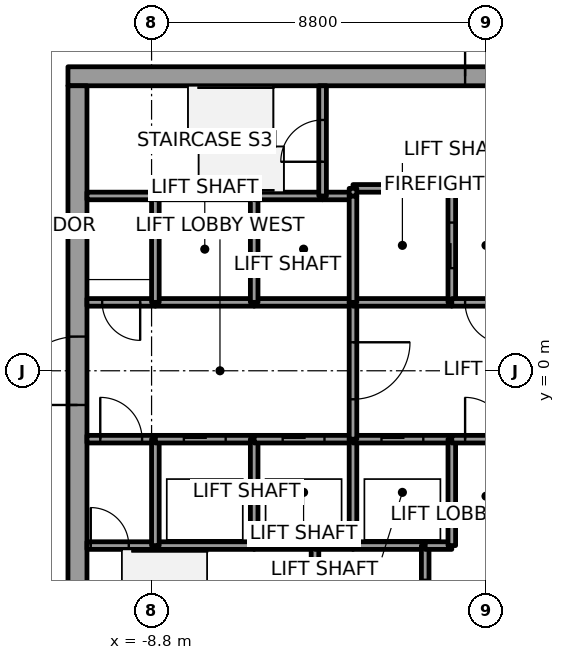
"""IFC4 building model, lengths in metres.
Left out: names, types, materials, properties, quantities, classifications, styles, units other than length and angle.
Written with IfcOpenShell. Run it as: python <this file> out.ifc"""

import sys

from ifc_helpers import new_model, si_unit, direction, frame, frame_2d, origin, place, context, subcontext, project, spatial, rectangle, extrude, element, fill, save


model = new_model("IFC4")
c1 = context("Model", 3, precision=1e-05, world=origin(), true_north=direction((0.0, 1.0)))
c2 = subcontext(c1, "Body", "Model", "MODEL_VIEW")
j1 = project(units=[si_unit("LENGTHUNIT", "METRE"), si_unit("PLANEANGLEUNIT", "RADIAN")], contexts=[c1])
p1 = place(None, origin())
s1 = spatial("IfcSite", under=j1, at=p1, CompositionType="ELEMENT")
p2 = place(p1, origin())
s2 = spatial("IfcBuilding", under=s1, at=p2, CompositionType="ELEMENT")
p3 = place(p2, frame((0.0, 0.0, 107.2)))
s3 = spatial("IfcBuildingStorey", under=s2, at=p3, CompositionType="ELEMENT", Elevation=107.2)
p4 = place(p3, frame((-11.0, 7.75, 0.0), z_axis=(0.0, 0.0, 1.0), x_axis=(1.0, 0.0, 0.0)))
e1 = element("IfcWall", 1, at=p4, inside=s3, PredefinedType="SHEAR", context=c2, shape_type="SweptSolid", body=[
    extrude(rectangle(XDim=22.0, YDim=0.5, at=frame_2d((11.0, 0.0))), origin(), (0.0, 0.0, 1.0), 5.4),
])
p5 = place(p4, frame((10.45, 0.0, 0.0)))
e2 = element("IfcOpeningElement", 2, at=p5, cuts=e1, PredefinedType="OPENING", context=c2, shape_type="SweptSolid", body=[
    extrude(rectangle(XDim=1.1, YDim=2.1, at=frame_2d((0.55, 1.05))), frame((0.0, 0.25, 0.0), z_axis=(0.0, -1.0, 0.0), x_axis=(1.0, 0.0, 0.0)), (0.0, 0.0, 1.0), 0.5),
])
p6 = place(p3, frame((-10.75, -7.5, 0.0), z_axis=(0.0, 0.0, 1.0), x_axis=(0.0, 1.0, 0.0)))
e3 = element("IfcWall", 3, at=p6, inside=s3, PredefinedType="SHEAR", context=c2, shape_type="SweptSolid", body=[
    extrude(rectangle(XDim=15.0, YDim=0.5, at=frame_2d((7.5, 0.0))), origin(), (0.0, 0.0, 1.0), 5.4),
])
p7 = place(p6, frame((6.6, 0.0, 0.0)))
e4 = element("IfcOpeningElement", 4, at=p7, cuts=e3, PredefinedType="OPENING", context=c2, shape_type="SweptSolid", body=[
    extrude(rectangle(XDim=1.8, YDim=2.1, at=frame_2d((0.9, 1.05))), frame((0.0, 0.25, 0.0), z_axis=(0.0, -1.0, 0.0), x_axis=(1.0, 0.0, 0.0)), (0.0, 0.0, 1.0), 0.5),
])
p8 = place(p3, frame((-10.5, -4.6, 0.0), z_axis=(0.0, 0.0, 1.0), x_axis=(1.0, 0.0, 0.0)))
e5 = element("IfcWall", 5, at=p8, inside=s3, PredefinedType="SOLIDWALL", context=c2, shape_type="SweptSolid", body=[
    extrude(rectangle(XDim=1.8, YDim=0.2, at=frame_2d((0.9, 0.0))), origin(), (0.0, 0.0, 1.0), 5.25),
])
p9 = place(p8, frame((0.1, 0.0, 0.0)))
e6 = element("IfcOpeningElement", 6, at=p9, cuts=e5, PredefinedType="OPENING", context=c2, shape_type="SweptSolid", body=[
    extrude(rectangle(XDim=1.0, YDim=2.1, at=frame_2d((0.5, 1.05))), frame((0.0, 0.1, 0.0), z_axis=(0.0, -1.0, 0.0), x_axis=(1.0, 0.0, 0.0)), (0.0, 0.0, 1.0), 0.2),
])
p10 = place(p3, frame((-10.5, -1.8, 0.0), z_axis=(0.0, 0.0, 1.0), x_axis=(1.0, 0.0, 0.0)))
e7 = element("IfcWall", 7, at=p10, inside=s3, PredefinedType="SOLIDWALL", context=c2, shape_type="SweptSolid", body=[
    extrude(rectangle(XDim=1.8, YDim=0.2, at=frame_2d((0.9, 0.0))), origin(), (0.0, 0.0, 1.0), 5.25),
])
p11 = place(p10, frame((0.35, 0.0, 0.0)))
e8 = element("IfcOpeningElement", 8, at=p11, cuts=e7, PredefinedType="OPENING", context=c2, shape_type="SweptSolid", body=[
    extrude(rectangle(XDim=1.1, YDim=2.1, at=frame_2d((0.55, 1.05))), frame((0.0, 0.1, 0.0), z_axis=(0.0, -1.0, 0.0), x_axis=(1.0, 0.0, 0.0)), (0.0, 0.0, 1.0), 0.2),
])
p12 = place(p3, frame((-8.7, 1.8, 0.0), z_axis=(0.0, 0.0, 1.0), x_axis=(-1.0, 0.0, 0.0)))
e9 = element("IfcWall", 9, at=p12, inside=s3, PredefinedType="SOLIDWALL", context=c2, shape_type="SweptSolid", body=[
    extrude(rectangle(XDim=1.8, YDim=0.2, at=frame_2d((0.9, 0.0))), origin(), (0.0, 0.0, 1.0), 5.25),
])
p13 = place(p12, frame((0.4, 0.0, 0.0)))
e10 = element("IfcOpeningElement", 10, at=p13, cuts=e9, PredefinedType="OPENING", context=c2, shape_type="SweptSolid", body=[
    extrude(rectangle(XDim=1.0, YDim=2.1, at=frame_2d((0.5, 1.05))), frame((0.0, 0.1, 0.0), z_axis=(0.0, -1.0, 0.0), x_axis=(1.0, 0.0, 0.0)), (0.0, 0.0, 1.0), 0.2),
])
p14 = place(p3, frame((-8.7, 4.6, 0.0), z_axis=(0.0, 0.0, 1.0), x_axis=(-1.0, 0.0, 0.0)))
e11 = element("IfcWall", 11, at=p14, inside=s3, PredefinedType="SOLIDWALL", context=c2, shape_type="SweptSolid", body=[
    extrude(rectangle(XDim=1.8, YDim=0.2, at=frame_2d((0.9, 0.0))), origin(), (0.0, 0.0, 1.0), 5.25),
])
p15 = place(p3, frame((-8.7, -4.6, 0.0), z_axis=(0.0, 0.0, 1.0), x_axis=(1.0, 0.0, 0.0)))
e12 = element("IfcWall", 12, at=p15, inside=s3, PredefinedType="SOLIDWALL", context=c2, shape_type="SweptSolid", body=[
    extrude(rectangle(XDim=2.6, YDim=0.2, at=frame_2d((1.3, 0.0))), origin(), (0.0, 0.0, 1.0), 5.25),
])
p16 = place(p3, frame((-8.7, -4.6, 0.0), z_axis=(0.0, 0.0, 1.0), x_axis=(0.0, 1.0, 0.0)))
e13 = element("IfcWall", 13, at=p16, inside=s3, PredefinedType="SOLIDWALL", context=c2, shape_type="SweptSolid", body=[
    extrude(rectangle(XDim=2.8, YDim=0.2, at=frame_2d((1.4, 0.0))), origin(), (0.0, 0.0, 1.0), 5.25),
])
p17 = place(p3, frame((-8.7, -1.8, 0.0), z_axis=(0.0, 0.0, 1.0), x_axis=(1.0, 0.0, 0.0)))
e14 = element("IfcWall", 14, at=p17, inside=s3, PredefinedType="SOLIDWALL", context=c2, shape_type="SweptSolid", body=[
    extrude(rectangle(XDim=2.6, YDim=0.2, at=frame_2d((1.3, 0.0))), origin(), (0.0, 0.0, 1.0), 5.25),
])
p18 = place(p17, frame((0.75, 0.0, 0.0)))
e15 = element("IfcOpeningElement", 15, at=p18, cuts=e14, PredefinedType="OPENING", context=c2, shape_type="SweptSolid", body=[
    extrude(rectangle(XDim=1.1, YDim=2.1, at=frame_2d((0.55, 1.05))), frame((0.0, 0.1, 0.0), z_axis=(0.0, -1.0, 0.0), x_axis=(1.0, 0.0, 0.0)), (0.0, 0.0, 1.0), 0.2),
])
p19 = place(p3, frame((-6.1, 1.8, 0.0), z_axis=(0.0, 0.0, 1.0), x_axis=(-1.0, 0.0, 0.0)))
e16 = element("IfcWall", 16, at=p19, inside=s3, PredefinedType="SOLIDWALL", context=c2, shape_type="SweptSolid", body=[
    extrude(rectangle(XDim=2.6, YDim=0.2, at=frame_2d((1.3, 0.0))), origin(), (0.0, 0.0, 1.0), 5.25),
])
p20 = place(p3, frame((-8.7, 1.8, 0.0), z_axis=(0.0, 0.0, 1.0), x_axis=(0.0, 1.0, 0.0)))
e17 = element("IfcWall", 17, at=p20, inside=s3, PredefinedType="SOLIDWALL", context=c2, shape_type="SweptSolid", body=[
    extrude(rectangle(XDim=2.8, YDim=0.2, at=frame_2d((1.4, 0.0))), origin(), (0.0, 0.0, 1.0), 5.25),
])
p21 = place(p3, frame((-6.1, 4.6, 0.0), z_axis=(0.0, 0.0, 1.0), x_axis=(-1.0, 0.0, 0.0)))
e18 = element("IfcWall", 18, at=p21, inside=s3, PredefinedType="SOLIDWALL", context=c2, shape_type="SweptSolid", body=[
    extrude(rectangle(XDim=2.6, YDim=0.2, at=frame_2d((1.3, 0.0))), origin(), (0.0, 0.0, 1.0), 5.25),
])
p22 = place(p3, frame((-6.1, -4.6, 0.0), z_axis=(0.0, 0.0, 1.0), x_axis=(1.0, 0.0, 0.0)))
e19 = element("IfcWall", 19, at=p22, inside=s3, PredefinedType="SOLIDWALL", context=c2, shape_type="SweptSolid", body=[
    extrude(rectangle(XDim=1.6, YDim=0.2, at=frame_2d((0.8, 0.0))), origin(), (0.0, 0.0, 1.0), 5.25),
])
p23 = place(p3, frame((-6.1, -4.6, 0.0), z_axis=(0.0, 0.0, 1.0), x_axis=(0.0, 1.0, 0.0)))
e20 = element("IfcWall", 20, at=p23, inside=s3, PredefinedType="SOLIDWALL", context=c2, shape_type="SweptSolid", body=[
    extrude(rectangle(XDim=2.8, YDim=0.2, at=frame_2d((1.4, 0.0))), origin(), (0.0, 0.0, 1.0), 5.25),
])
p24 = place(p3, frame((-6.1, -1.8, 0.0), z_axis=(0.0, 0.0, 1.0), x_axis=(1.0, 0.0, 0.0)))
e21 = element("IfcWall", 21, at=p24, inside=s3, PredefinedType="SOLIDWALL", context=c2, shape_type="SweptSolid", body=[
    extrude(rectangle(XDim=2.6, YDim=0.2, at=frame_2d((1.3, 0.0))), origin(), (0.0, 0.0, 1.0), 5.25),
])
p25 = place(p24, frame((0.75, 0.0, 0.0)))
e22 = element("IfcOpeningElement", 22, at=p25, cuts=e21, PredefinedType="OPENING", context=c2, shape_type="SweptSolid", body=[
    extrude(rectangle(XDim=1.1, YDim=2.1, at=frame_2d((0.55, 1.05))), frame((0.0, 0.1, 0.0), z_axis=(0.0, -1.0, 0.0), x_axis=(1.0, 0.0, 0.0)), (0.0, 0.0, 1.0), 0.2),
])
p26 = place(p3, frame((-3.5, 1.8, 0.0), z_axis=(0.0, 0.0, 1.0), x_axis=(-1.0, 0.0, 0.0)))
e23 = element("IfcWall", 23, at=p26, inside=s3, PredefinedType="SOLIDWALL", context=c2, shape_type="SweptSolid", body=[
    extrude(rectangle(XDim=2.6, YDim=0.2, at=frame_2d((1.3, 0.0))), origin(), (0.0, 0.0, 1.0), 5.25),
])
p27 = place(p3, frame((-6.1, 1.8, 0.0), z_axis=(0.0, 0.0, 1.0), x_axis=(0.0, 1.0, 0.0)))
e24 = element("IfcWall", 24, at=p27, inside=s3, PredefinedType="SOLIDWALL", context=c2, shape_type="SweptSolid", body=[
    extrude(rectangle(XDim=2.8, YDim=0.2, at=frame_2d((1.4, 0.0))), origin(), (0.0, 0.0, 1.0), 5.25),
])
p28 = place(p3, frame((-4.3, 4.6, 0.0), z_axis=(0.0, 0.0, 1.0), x_axis=(-1.0, 0.0, 0.0)))
e25 = element("IfcWall", 25, at=p28, inside=s3, PredefinedType="SOLIDWALL", context=c2, shape_type="SweptSolid", body=[
    extrude(rectangle(XDim=1.8, YDim=0.2, at=frame_2d((0.9, 0.0))), origin(), (0.0, 0.0, 1.0), 5.25),
])
p29 = place(p3, frame((-4.5, -4.6, 0.0), z_axis=(0.0, 0.0, 1.0), x_axis=(0.0, -1.0, 0.0)))
e26 = element("IfcWall", 26, at=p29, inside=s3, PredefinedType="SOLIDWALL", context=c2, shape_type="SweptSolid", body=[
    extrude(rectangle(XDim=2.9, YDim=0.2, at=frame_2d((1.45, 0.0))), origin(), (0.0, 0.0, 1.0), 5.25),
])
p30 = place(p3, frame((-4.5, -4.6, 0.0), z_axis=(0.0, 0.0, 1.0), x_axis=(1.0, 0.0, 0.0)))
e27 = element("IfcWall", 27, at=p30, inside=s3, PredefinedType="SOLIDWALL", context=c2, shape_type="SweptSolid", body=[
    extrude(rectangle(XDim=1.0, YDim=0.2, at=frame_2d((0.5, 0.0))), origin(), (0.0, 0.0, 1.0), 5.25),
])
p31 = place(p3, frame((-3.5, 4.6, 0.0), z_axis=(0.0, 0.0, 1.0), x_axis=(-1.0, 0.0, 0.0)))
e28 = element("IfcWall", 28, at=p31, inside=s3, PredefinedType="SOLIDWALL", context=c2, shape_type="SweptSolid", body=[
    extrude(rectangle(XDim=0.8, YDim=0.2, at=frame_2d((0.4, 0.0))), origin(), (0.0, 0.0, 1.0), 5.25),
])
p32 = place(p3, frame((-4.3, 4.6, 0.0), z_axis=(0.0, 0.0, 1.0), x_axis=(0.0, 1.0, 0.0)))
e29 = element("IfcWall", 29, at=p32, inside=s3, PredefinedType="SOLIDWALL", context=c2, shape_type="SweptSolid", body=[
    extrude(rectangle(XDim=2.9, YDim=0.2, at=frame_2d((1.45, 0.0))), origin(), (0.0, 0.0, 1.0), 5.25),
])
p33 = place(p32, frame((0.9, 0.0, 0.0)))
e30 = element("IfcOpeningElement", 30, at=p33, cuts=e29, PredefinedType="OPENING", context=c2, shape_type="SweptSolid", body=[
    extrude(rectangle(XDim=1.1, YDim=2.1, at=frame_2d((0.55, 1.05))), frame((0.0, 0.1, 0.0), z_axis=(0.0, -1.0, 0.0), x_axis=(1.0, 0.0, 0.0)), (0.0, 0.0, 1.0), 0.2),
])
p34 = place(p3, frame((-3.5, -4.6, 0.0), z_axis=(0.0, 0.0, 1.0), x_axis=(1.0, 0.0, 0.0)))
e31 = element("IfcWall", 31, at=p34, inside=s3, PredefinedType="SOLIDWALL", context=c2, shape_type="SweptSolid", body=[
    extrude(rectangle(XDim=1.9, YDim=0.2, at=frame_2d((0.95, 0.0))), origin(), (0.0, 0.0, 1.0), 5.25),
])
p35 = place(p3, frame((-3.5, -4.6, 0.0), z_axis=(0.0, 0.0, 1.0), x_axis=(0.0, 1.0, 0.0)))
e32 = element("IfcWall", 32, at=p35, inside=s3, PredefinedType="SOLIDWALL", context=c2, shape_type="SweptSolid", body=[
    extrude(rectangle(XDim=2.8, YDim=0.2, at=frame_2d((1.4, 0.0))), origin(), (0.0, 0.0, 1.0), 5.25),
])
p36 = place(p3, frame((-3.5, -1.8, 0.0), z_axis=(0.0, 0.0, 1.0), x_axis=(1.0, 0.0, 0.0)))
e33 = element("IfcWall", 33, at=p36, inside=s3, PredefinedType="SOLIDWALL", context=c2, shape_type="SweptSolid", body=[
    extrude(rectangle(XDim=2.6, YDim=0.2, at=frame_2d((1.3, 0.0))), origin(), (0.0, 0.0, 1.0), 5.25),
])
p37 = place(p36, frame((0.75, 0.0, 0.0)))
e34 = element("IfcOpeningElement", 34, at=p37, cuts=e33, PredefinedType="OPENING", context=c2, shape_type="SweptSolid", body=[
    extrude(rectangle(XDim=1.1, YDim=2.1, at=frame_2d((0.55, 1.05))), frame((0.0, 0.1, 0.0), z_axis=(0.0, -1.0, 0.0), x_axis=(1.0, 0.0, 0.0)), (0.0, 0.0, 1.0), 0.2),
])
p38 = place(p3, frame((-3.5, 1.8, 0.0), z_axis=(0.0, 0.0, 1.0), x_axis=(0.0, -1.0, 0.0)))
e35 = element("IfcWall", 35, at=p38, inside=s3, PredefinedType="SOLIDWALL", context=c2, shape_type="SweptSolid", body=[
    extrude(rectangle(XDim=3.6, YDim=0.2, at=frame_2d((1.8, 0.0))), origin(), (0.0, 0.0, 1.0), 5.25),
])
p39 = place(p38, frame((1.05, 0.0, 0.0)))
e36 = element("IfcOpeningElement", 36, at=p39, cuts=e35, PredefinedType="OPENING", context=c2, shape_type="SweptSolid", body=[
    extrude(rectangle(XDim=1.5, YDim=2.1, at=frame_2d((0.75, 1.05))), frame((0.0, 0.1, 0.0), z_axis=(0.0, -1.0, 0.0), x_axis=(1.0, 0.0, 0.0)), (0.0, 0.0, 1.0), 0.2),
])
p40 = place(p3, frame((-0.9, 1.8, 0.0), z_axis=(0.0, 0.0, 1.0), x_axis=(-1.0, 0.0, 0.0)))
e37 = element("IfcWall", 37, at=p40, inside=s3, PredefinedType="SOLIDWALL", context=c2, shape_type="SweptSolid", body=[
    extrude(rectangle(XDim=2.6, YDim=0.2, at=frame_2d((1.3, 0.0))), origin(), (0.0, 0.0, 1.0), 5.25),
])
p41 = place(p3, frame((-3.5, 4.6, 0.0), z_axis=(0.0, 0.0, 1.0), x_axis=(0.0, -1.0, 0.0)))
e38 = element("IfcWall", 38, at=p41, inside=s3, PredefinedType="SOLIDWALL", context=c2, shape_type="SweptSolid", body=[
    extrude(rectangle(XDim=2.8, YDim=0.2, at=frame_2d((1.4, 0.0))), origin(), (0.0, 0.0, 1.0), 5.25),
])
p42 = place(p3, frame((-0.9, 1.8, 0.0), z_axis=(0.0, 0.0, 1.0), x_axis=(0.0, 1.0, 0.0)))
e39 = element("IfcWall", 39, at=p42, inside=s3, PredefinedType="SOLIDWALL", context=c2, shape_type="SweptSolid", body=[
    extrude(rectangle(XDim=3.0, YDim=0.2, at=frame_2d((1.5, 0.0))), origin(), (0.0, 0.0, 1.0), 5.25),
])
p43 = place(p42, frame((0.9, 0.0, 0.0)))
e40 = element("IfcOpeningElement", 40, at=p43, cuts=e39, PredefinedType="OPENING", context=c2, shape_type="SweptSolid", body=[
    extrude(rectangle(XDim=1.2, YDim=2.1, at=frame_2d((0.6, 1.05))), frame((0.0, 0.1, 0.0), z_axis=(0.0, -1.0, 0.0), x_axis=(1.0, 0.0, 0.0)), (0.0, 0.0, 1.0), 0.2),
])
p44 = place(p3, frame((-0.9, 4.8, 0.0), z_axis=(0.0, 0.0, 1.0), x_axis=(-1.0, 0.0, 0.0)))
e41 = element("IfcWall", 41, at=p44, inside=s3, PredefinedType="SOLIDWALL", context=c2, shape_type="SweptSolid", body=[
    extrude(rectangle(XDim=2.6, YDim=0.2, at=frame_2d((1.3, 0.0))), origin(), (0.0, 0.0, 1.0), 5.25),
])
p45 = place(p3, frame((-3.5, 4.8, 0.0), z_axis=(0.0, 0.0, 1.0), x_axis=(0.0, -1.0, 0.0)))
e42 = element("IfcWall", 42, at=p45, inside=s3, PredefinedType="SOLIDWALL", context=c2, shape_type="SweptSolid", body=[
    extrude(rectangle(XDim=0.2, YDim=0.2, at=frame_2d((0.1, 0.0))), origin(), (0.0, 0.0, 1.0), 5.25),
])
p46 = place(p3, frame((-1.6, -7.5, 0.0), z_axis=(0.0, 0.0, 1.0), x_axis=(0.0, 1.0, 0.0)))
e43 = element("IfcWall", 43, at=p46, inside=s3, PredefinedType="SOLIDWALL", context=c2, shape_type="SweptSolid", body=[
    extrude(rectangle(XDim=2.9, YDim=0.2, at=frame_2d((1.45, 0.0))), origin(), (0.0, 0.0, 1.0), 5.25),
])
p47 = place(p46, frame((0.9, 0.0, 0.0)))
e44 = element("IfcOpeningElement", 44, at=p47, cuts=e43, PredefinedType="OPENING", context=c2, shape_type="SweptSolid", body=[
    extrude(rectangle(XDim=1.1, YDim=2.1, at=frame_2d((0.55, 1.05))), frame((0.0, 0.1, 0.0), z_axis=(0.0, -1.0, 0.0), x_axis=(1.0, 0.0, 0.0)), (0.0, 0.0, 1.0), 0.2),
])
p48 = place(p3, frame((-1.6, -4.6, 0.0), z_axis=(0.0, 0.0, 1.0), x_axis=(1.0, 0.0, 0.0)))
e45 = element("IfcWall", 45, at=p48, inside=s3, PredefinedType="SOLIDWALL", context=c2, shape_type="SweptSolid", body=[
    extrude(rectangle(XDim=0.7, YDim=0.2, at=frame_2d((0.35, 0.0))), origin(), (0.0, 0.0, 1.0), 5.25),
])
p49 = place(p3, frame((-0.9, -4.6, 0.0), z_axis=(0.0, 0.0, 1.0), x_axis=(0.0, 1.0, 0.0)))
e46 = element("IfcWall", 46, at=p49, inside=s3, PredefinedType="SOLIDWALL", context=c2, shape_type="SweptSolid", body=[
    extrude(rectangle(XDim=2.8, YDim=0.2, at=frame_2d((1.4, 0.0))), origin(), (0.0, 0.0, 1.0), 5.25),
])
p50 = place(p3, frame((-0.9, -1.8, 0.0), z_axis=(0.0, 0.0, 1.0), x_axis=(1.0, 0.0, 0.0)))
e47 = element("IfcWall", 47, at=p50, inside=s3, PredefinedType="SOLIDWALL", context=c2, shape_type="SweptSolid", body=[
    extrude(rectangle(XDim=1.8, YDim=0.2, at=frame_2d((0.9, 0.0))), origin(), (0.0, 0.0, 1.0), 5.25),
])
p51 = place(p50, frame((0.35, 0.0, 0.0)))
e48 = element("IfcOpeningElement", 48, at=p51, cuts=e47, PredefinedType="OPENING", context=c2, shape_type="SweptSolid", body=[
    extrude(rectangle(XDim=1.1, YDim=2.1, at=frame_2d((0.55, 1.05))), frame((0.0, 0.1, 0.0), z_axis=(0.0, -1.0, 0.0), x_axis=(1.0, 0.0, 0.0)), (0.0, 0.0, 1.0), 0.2),
])
p52 = place(p3, frame((0.9, 1.8, 0.0), z_axis=(0.0, 0.0, 1.0), x_axis=(-1.0, 0.0, 0.0)))
e49 = element("IfcWall", 49, at=p52, inside=s3, PredefinedType="SOLIDWALL", context=c2, shape_type="SweptSolid", body=[
    extrude(rectangle(XDim=1.8, YDim=0.2, at=frame_2d((0.9, 0.0))), origin(), (0.0, 0.0, 1.0), 5.25),
])
p53 = place(p52, frame((0.35, 0.0, 0.0)))
e50 = element("IfcOpeningElement", 50, at=p53, cuts=e49, PredefinedType="OPENING", context=c2, shape_type="SweptSolid", body=[
    extrude(rectangle(XDim=1.1, YDim=2.1, at=frame_2d((0.55, 1.05))), frame((0.0, 0.1, 0.0), z_axis=(0.0, -1.0, 0.0), x_axis=(1.0, 0.0, 0.0)), (0.0, 0.0, 1.0), 0.2),
])
p54 = place(p18, origin())
e51 = element("IfcDoor", 51, at=p54, inside=s3, OperationType="SLIDING_TO_LEFT", PredefinedType="DOOR", context=c2, shape_type="SweptSolid", body=[
    extrude(rectangle(XDim=1.1, YDim=2.1, at=frame_2d((0.55, 1.05))), frame((0.0, 0.025, 0.0), z_axis=(0.0, -1.0, 0.0), x_axis=(1.0, 0.0, 0.0)), (0.0, 0.0, 1.0), 0.05),
])
fill(e15, e51)
p55 = place(p25, origin())
e52 = element("IfcDoor", 52, at=p55, inside=s3, OperationType="SLIDING_TO_RIGHT", PredefinedType="DOOR", context=c2, shape_type="SweptSolid", body=[
    extrude(rectangle(XDim=1.1, YDim=2.1, at=frame_2d((0.55, 1.05))), frame((0.0, 0.025, 0.0), z_axis=(0.0, -1.0, 0.0), x_axis=(1.0, 0.0, 0.0)), (0.0, 0.0, 1.0), 0.05),
])
fill(e22, e52)
p56 = place(p37, origin())
e53 = element("IfcDoor", 53, at=p56, inside=s3, OperationType="SLIDING_TO_RIGHT", PredefinedType="DOOR", context=c2, shape_type="SweptSolid", body=[
    extrude(rectangle(XDim=1.1, YDim=2.1, at=frame_2d((0.55, 1.05))), frame((0.0, 0.025, 0.0), z_axis=(0.0, -1.0, 0.0), x_axis=(1.0, 0.0, 0.0)), (0.0, 0.0, 1.0), 0.05),
])
fill(e34, e53)
p57 = place(p43, origin())
e54 = element("IfcDoor", 54, at=p57, inside=s3, OperationType="SLIDING_TO_RIGHT", PredefinedType="DOOR", context=c2, shape_type="SweptSolid", body=[
    extrude(rectangle(XDim=1.2, YDim=2.1, at=frame_2d((0.6, 1.05))), frame((0.0, 0.025, 0.0), z_axis=(0.0, -1.0, 0.0), x_axis=(1.0, 0.0, 0.0)), (0.0, 0.0, 1.0), 0.05),
])
fill(e40, e54)
p58 = place(p39, origin())
e55 = element("IfcDoor", 55, at=p58, inside=s3, OperationType="DOUBLE_DOOR_SINGLE_SWING", PredefinedType="DOOR", context=c2, shape_type="SweptSolid", body=[
    extrude(rectangle(XDim=1.5, YDim=2.1, at=frame_2d((0.75, 1.05))), frame((0.0, 0.025, 0.0), z_axis=(0.0, -1.0, 0.0), x_axis=(1.0, 0.0, 0.0)), (0.0, 0.0, 1.0), 0.05),
])
fill(e36, e55)
p59 = place(p11, origin())
e56 = element("IfcDoor", 56, at=p59, inside=s3, OperationType="SINGLE_SWING_LEFT", PredefinedType="DOOR", context=c2, shape_type="SweptSolid", body=[
    extrude(rectangle(XDim=1.1, YDim=2.1, at=frame_2d((0.55, 1.05))), frame((0.0, 0.025, 0.0), z_axis=(0.0, -1.0, 0.0), x_axis=(1.0, 0.0, 0.0)), (0.0, 0.0, 1.0), 0.05),
])
fill(e8, e56)
p60 = place(p53, origin())
e57 = element("IfcDoor", 57, at=p60, inside=s3, OperationType="SINGLE_SWING_LEFT", PredefinedType="DOOR", context=c2, shape_type="SweptSolid", body=[
    extrude(rectangle(XDim=1.1, YDim=2.1, at=frame_2d((0.55, 1.05))), frame((0.0, 0.025, 0.0), z_axis=(0.0, -1.0, 0.0), x_axis=(1.0, 0.0, 0.0)), (0.0, 0.0, 1.0), 0.05),
])
fill(e50, e57)
p61 = place(p51, origin())
e58 = element("IfcDoor", 58, at=p61, inside=s3, OperationType="SINGLE_SWING_LEFT", PredefinedType="DOOR", context=c2, shape_type="SweptSolid", body=[
    extrude(rectangle(XDim=1.1, YDim=2.1, at=frame_2d((0.55, 1.05))), frame((0.0, 0.025, 0.0), z_axis=(0.0, -1.0, 0.0), x_axis=(1.0, 0.0, 0.0)), (0.0, 0.0, 1.0), 0.05),
])
fill(e48, e58)
p62 = place(p13, origin())
e59 = element("IfcDoor", 59, at=p62, inside=s3, OperationType="SINGLE_SWING_RIGHT", PredefinedType="DOOR", context=c2, shape_type="SweptSolid", body=[
    extrude(rectangle(XDim=1.0, YDim=2.1, at=frame_2d((0.5, 1.05))), frame((0.0, 0.025, 0.0), z_axis=(0.0, -1.0, 0.0), x_axis=(1.0, 0.0, 0.0)), (0.0, 0.0, 1.0), 0.05),
])
fill(e10, e59)
p63 = place(p9, origin())
e60 = element("IfcDoor", 60, at=p63, inside=s3, OperationType="SINGLE_SWING_LEFT", PredefinedType="DOOR", context=c2, shape_type="SweptSolid", body=[
    extrude(rectangle(XDim=1.0, YDim=2.1, at=frame_2d((0.5, 1.05))), frame((0.0, 0.025, 0.0), z_axis=(0.0, -1.0, 0.0), x_axis=(1.0, 0.0, 0.0)), (0.0, 0.0, 1.0), 0.05),
])
fill(e6, e60)
p64 = place(p33, origin())
e61 = element("IfcDoor", 61, at=p64, inside=s3, OperationType="SINGLE_SWING_RIGHT", PredefinedType="DOOR", context=c2, shape_type="SweptSolid", body=[
    extrude(rectangle(XDim=1.1, YDim=2.1, at=frame_2d((0.55, 1.05))), frame((0.0, 0.025, 0.0), z_axis=(0.0, -1.0, 0.0), x_axis=(1.0, 0.0, 0.0)), (0.0, 0.0, 1.0), 0.05),
])
fill(e30, e61)
p65 = place(p7, origin())
e62 = element("IfcDoor", 62, at=p65, inside=s3, OperationType="DOUBLE_DOOR_SINGLE_SWING", PredefinedType="DOOR", context=c2, shape_type="SweptSolid", body=[
    extrude(rectangle(XDim=1.8, YDim=2.1, at=frame_2d((0.9, 1.05))), frame((0.0, 0.025, 0.0), z_axis=(0.0, -1.0, 0.0), x_axis=(1.0, 0.0, 0.0)), (0.0, 0.0, 1.0), 0.05),
])
fill(e4, e62)
p66 = place(p5, origin())
e63 = element("IfcDoor", 63, at=p66, inside=s3, OperationType="SINGLE_SWING_RIGHT", PredefinedType="DOOR", context=c2, shape_type="SweptSolid", body=[
    extrude(rectangle(XDim=1.1, YDim=2.1, at=frame_2d((0.55, 1.05))), frame((0.0, 0.025, 0.0), z_axis=(0.0, -1.0, 0.0), x_axis=(1.0, 0.0, 0.0)), (0.0, 0.0, 1.0), 0.05),
])
fill(e2, e63)
save(model, sys.argv[1])
